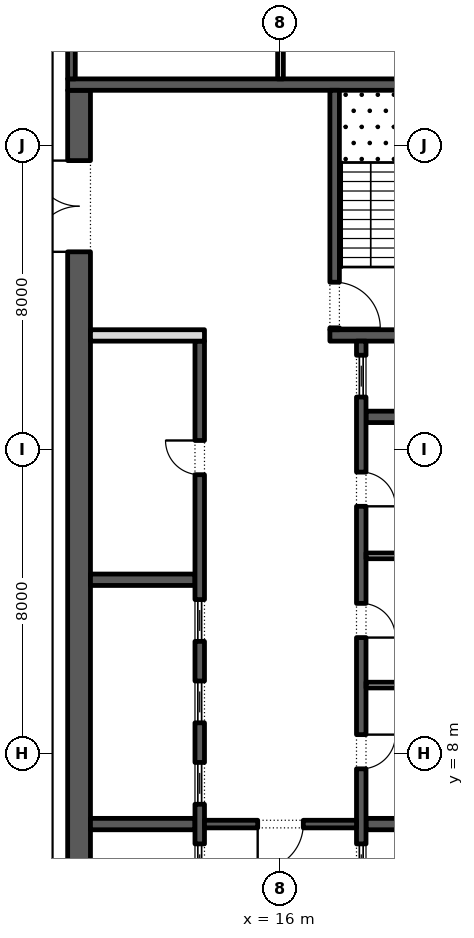
"""IFC4 building model, lengths in metres.
Left out: names, types, materials, properties, quantities, classifications, styles, units other than length and angle.
Written with IfcOpenShell. Run it as: python <this file> out.ifc"""

import sys

from ifc_helpers import new_model, si_unit, direction, frame, frame_2d, origin, place, context, subcontext, project, spatial, rectangle, extrude, element, fill, save


model = new_model("IFC4")
c1 = context("Model", 3, precision=1e-05, world=origin(), true_north=direction((0.0, 1.0)))
c2 = subcontext(c1, "Body", "Model", "MODEL_VIEW")
j1 = project(units=[si_unit("LENGTHUNIT", "METRE"), si_unit("PLANEANGLEUNIT", "RADIAN")], contexts=[c1])
p1 = place(None, origin())
s1 = spatial("IfcSite", under=j1, at=p1, CompositionType="ELEMENT")
p2 = place(p1, origin())
s2 = spatial("IfcBuilding", under=s1, at=p2, CompositionType="ELEMENT")
p3 = place(p2, frame((0.0, 0.0, 264.0)))
s3 = spatial("IfcBuildingStorey", under=s2, at=p3, CompositionType="ELEMENT", Elevation=264.0)
p4 = place(p3, frame((10.7, -2.45, 0.0), z_axis=(0.0, 0.0, 1.0), x_axis=(0.0, 1.0, 0.0)))
e1 = element("IfcWall", 1, at=p4, inside=s3, PredefinedType="SHEAR", context=c2, shape_type="SweptSolid", body=[
    extrude(rectangle(XDim=27.9, YDim=0.6, at=frame_2d((13.95, 0.0))), origin(), (0.0, 0.0, 1.0), 4.0),
])
p5 = place(p4, frame((23.65, 0.0, 0.0)))
e2 = element("IfcOpeningElement", 2, at=p5, cuts=e1, PredefinedType="OPENING", context=c2, shape_type="SweptSolid", body=[
    extrude(rectangle(XDim=2.4, YDim=2.1, at=frame_2d((1.2, 1.05))), frame((0.0, 0.31, 0.0), z_axis=(0.0, -1.0, 0.0), x_axis=(1.0, 0.0, 0.0)), (0.0, 0.0, 1.0), 0.62),
])
p6 = place(p4, frame((1.387, 0.0, 0.0)))
e3 = element("IfcOpeningElement", 3, at=p6, cuts=e1, PredefinedType="OPENING", context=c2, shape_type="SweptSolid", body=[
    extrude(rectangle(XDim=0.9, YDim=2.1, at=frame_2d((0.45, 1.05))), frame((0.0, 0.31, 0.0), z_axis=(0.0, -1.0, 0.0), x_axis=(1.0, 0.0, 0.0)), (0.0, 0.0, 1.0), 0.62),
])
p7 = place(p4, frame((4.562, 0.0, 0.0)))
e4 = element("IfcOpeningElement", 4, at=p7, cuts=e1, PredefinedType="OPENING", context=c2, shape_type="SweptSolid", body=[
    extrude(rectangle(XDim=1.0, YDim=2.1, at=frame_2d((0.5, 1.05))), frame((0.0, 0.31, 0.0), z_axis=(0.0, -1.0, 0.0), x_axis=(1.0, 0.0, 0.0)), (0.0, 0.0, 1.0), 0.62),
])
p8 = place(p3, frame((10.4, 25.6, 0.0), z_axis=(0.0, 0.0, 1.0), x_axis=(1.0, 0.0, 0.0)))
e5 = element("IfcWall", 5, at=p8, inside=s3, PredefinedType="SHEAR", context=c2, shape_type="SweptSolid", body=[
    extrude(rectangle(XDim=11.2, YDim=0.3, at=frame_2d((5.6, 0.0))), origin(), (0.0, 0.0, 1.0), 4.0),
])
p9 = place(p3, frame((17.3, 19.0, 0.0), z_axis=(0.0, 0.0, 1.0), x_axis=(1.0, 0.0, 0.0)))
e6 = element("IfcWall", 6, at=p9, inside=s3, PredefinedType="SHEAR", context=c2, shape_type="SweptSolid", body=[
    extrude(rectangle(XDim=3.7, YDim=0.3, at=frame_2d((1.85, 0.0))), origin(), (0.0, 0.0, 1.0), 4.0),
])
p10 = place(p3, frame((17.425, 19.15, 0.0), z_axis=(0.0, 0.0, 1.0), x_axis=(0.0, 1.0, 0.0)))
e7 = element("IfcWall", 7, at=p10, inside=s3, PredefinedType="SHEAR", context=c2, shape_type="SweptSolid", body=[
    extrude(rectangle(XDim=6.3, YDim=0.25, at=frame_2d((3.15, 0.0))), origin(), (0.0, 0.0, 1.0), 4.0),
])
p11 = place(p10, frame((0.05, 0.0, 0.0)))
e8 = element("IfcOpeningElement", 8, at=p11, cuts=e7, PredefinedType="OPENING", context=c2, shape_type="SweptSolid", body=[
    extrude(rectangle(XDim=1.2, YDim=2.1, at=frame_2d((0.6, 1.05))), frame((0.0, 0.135, 0.0), z_axis=(0.0, -1.0, 0.0), x_axis=(1.0, 0.0, 0.0)), (0.0, 0.0, 1.0), 0.27),
])
for number, where, z_axis, x_axis in (
    (9, (18.25, 6.143, 0.0), (0.0, 0.0, 1.0), (1.0, 0.0, 0.0)),
    (10, (18.25, 16.857, 0.0), (0.0, 0.0, 1.0), (1.0, 0.0, 0.0)),
):
    element("IfcWall", number, at=place(p3, frame(where, z_axis=z_axis, x_axis=x_axis)), inside=s3, PredefinedType="SHEAR", context=c2, shape_type="SweptSolid", body=[
        extrude(rectangle(XDim=2.75, YDim=0.3, at=frame_2d((1.375, 0.0))), origin(), (0.0, 0.0, 1.0), 4.0),
    ])
p12 = place(p3, frame((18.125, 4.15, 0.0), z_axis=(0.0, 0.0, 1.0), x_axis=(0.0, 1.0, 0.0)))
e11 = element("IfcWall", 11, at=p12, inside=s3, PredefinedType="SHEAR", context=c2, shape_type="SweptSolid", body=[
    extrude(rectangle(XDim=14.7, YDim=0.25, at=frame_2d((7.35, 0.0))), origin(), (0.0, 0.0, 1.0), 4.0),
])
p13 = place(p12, frame((3.446, 0.0, 0.0)))
e12 = element("IfcOpeningElement", 12, at=p13, cuts=e11, PredefinedType="OPENING", context=c2, shape_type="SweptSolid", body=[
    extrude(rectangle(XDim=0.9, YDim=2.1, at=frame_2d((0.45, 1.05))), frame((0.0, 0.135, 0.0), z_axis=(0.0, -1.0, 0.0), x_axis=(1.0, 0.0, 0.0)), (0.0, 0.0, 1.0), 0.27),
])
p14 = place(p12, frame((6.9, 0.0, 0.0)))
e13 = element("IfcOpeningElement", 13, at=p14, cuts=e11, PredefinedType="OPENING", context=c2, shape_type="SweptSolid", body=[
    extrude(rectangle(XDim=0.9, YDim=2.1, at=frame_2d((0.45, 1.05))), frame((0.0, 0.135, 0.0), z_axis=(0.0, -1.0, 0.0), x_axis=(1.0, 0.0, 0.0)), (0.0, 0.0, 1.0), 0.27),
])
p15 = place(p12, frame((10.354, 0.0, 0.0)))
e14 = element("IfcOpeningElement", 14, at=p15, cuts=e11, PredefinedType="OPENING", context=c2, shape_type="SweptSolid", body=[
    extrude(rectangle(XDim=0.9, YDim=2.1, at=frame_2d((0.45, 1.05))), frame((0.0, 0.135, 0.0), z_axis=(0.0, -1.0, 0.0), x_axis=(1.0, 0.0, 0.0)), (0.0, 0.0, 1.0), 0.27),
])
p16 = place(p12, frame((0.371, 0.0, 0.0)))
e15 = element("IfcOpeningElement", 15, at=p16, cuts=e11, PredefinedType="OPENING", context=c2, shape_type="SweptSolid", body=[
    extrude(rectangle(XDim=1.1, YDim=2.1, at=frame_2d((0.55, 1.05))), frame((0.0, 0.135, 0.0), z_axis=(0.0, -1.0, 0.0), x_axis=(1.0, 0.0, 0.0)), (0.0, 0.0, 1.0), 0.27),
])
p17 = place(p12, frame((13.229, 0.0, 0.0)))
e16 = element("IfcOpeningElement", 16, at=p17, cuts=e11, PredefinedType="OPENING", context=c2, shape_type="SweptSolid", body=[
    extrude(rectangle(XDim=1.1, YDim=2.1, at=frame_2d((0.55, 1.05))), frame((0.0, 0.135, 0.0), z_axis=(0.0, -1.0, 0.0), x_axis=(1.0, 0.0, 0.0)), (0.0, 0.0, 1.0), 0.27),
])
for number, where, z_axis, x_axis in (
    (17, (18.25, 9.8, 0.0), (0.0, 0.0, 1.0), (1.0, 0.0, 0.0)),
    (18, (18.25, 13.2, 0.0), (0.0, 0.0, 1.0), (1.0, 0.0, 0.0)),
):
    element("IfcWall", number, at=place(p3, frame(where, z_axis=z_axis, x_axis=x_axis)), inside=s3, PredefinedType="PARTITIONING", context=c2, shape_type="SweptSolid", body=[
        extrude(rectangle(XDim=2.75, YDim=0.15, at=frame_2d((1.375, 0.0))), origin(), (0.0, 0.0, 1.0), 4.0),
    ])
for number, where, z_axis, x_axis in (
    (19, (11.0, 6.143, 0.0), (0.0, 0.0, 1.0), (1.0, 0.0, 0.0)),
    (20, (11.0, 12.571, 0.0), (0.0, 0.0, 1.0), (1.0, 0.0, 0.0)),
):
    element("IfcWall", number, at=place(p3, frame(where, z_axis=z_axis, x_axis=x_axis)), inside=s3, PredefinedType="SHEAR", context=c2, shape_type="SweptSolid", body=[
        extrude(rectangle(XDim=2.75, YDim=0.3, at=frame_2d((1.375, 0.0))), origin(), (0.0, 0.0, 1.0), 4.0),
    ])
p18 = place(p3, frame((13.875, -2.45, 0.0), z_axis=(0.0, 0.0, 1.0), x_axis=(0.0, 1.0, 0.0)))
e21 = element("IfcWall", 21, at=p18, inside=s3, PredefinedType="SHEAR", context=c2, shape_type="SweptSolid", body=[
    extrude(rectangle(XDim=21.3, YDim=0.25, at=frame_2d((10.65, 0.0))), origin(), (0.0, 0.0, 1.0), 4.0),
])
p19 = place(p18, frame((17.786, 0.0, 0.0)))
e22 = element("IfcOpeningElement", 22, at=p19, cuts=e21, PredefinedType="OPENING", context=c2, shape_type="SweptSolid", body=[
    extrude(rectangle(XDim=0.9, YDim=2.1, at=frame_2d((0.45, 1.05))), frame((0.0, 0.135, 0.0), z_axis=(0.0, -1.0, 0.0), x_axis=(1.0, 0.0, 0.0)), (0.0, 0.0, 1.0), 0.27),
])
p20 = place(p18, frame((6.971, 0.0, 0.0)))
e23 = element("IfcOpeningElement", 23, at=p20, cuts=e21, PredefinedType="OPENING", context=c2, shape_type="SweptSolid", body=[
    extrude(rectangle(XDim=1.1, YDim=2.1, at=frame_2d((0.55, 1.05))), frame((0.0, 0.135, 0.0), z_axis=(0.0, -1.0, 0.0), x_axis=(1.0, 0.0, 0.0)), (0.0, 0.0, 1.0), 0.27),
])
p21 = place(p18, frame((9.114, 0.0, 0.0)))
e24 = element("IfcOpeningElement", 24, at=p21, cuts=e21, PredefinedType="OPENING", context=c2, shape_type="SweptSolid", body=[
    extrude(rectangle(XDim=1.1, YDim=2.1, at=frame_2d((0.55, 1.05))), frame((0.0, 0.135, 0.0), z_axis=(0.0, -1.0, 0.0), x_axis=(1.0, 0.0, 0.0)), (0.0, 0.0, 1.0), 0.27),
])
p22 = place(p18, frame((11.257, 0.0, 0.0)))
e25 = element("IfcOpeningElement", 25, at=p22, cuts=e21, PredefinedType="OPENING", context=c2, shape_type="SweptSolid", body=[
    extrude(rectangle(XDim=1.1, YDim=2.1, at=frame_2d((0.55, 1.05))), frame((0.0, 0.135, 0.0), z_axis=(0.0, -1.0, 0.0), x_axis=(1.0, 0.0, 0.0)), (0.0, 0.0, 1.0), 0.27),
])
p23 = place(p18, frame((13.4, 0.0, 0.0)))
e26 = element("IfcOpeningElement", 26, at=p23, cuts=e21, PredefinedType="OPENING", context=c2, shape_type="SweptSolid", body=[
    extrude(rectangle(XDim=1.1, YDim=2.1, at=frame_2d((0.55, 1.05))), frame((0.0, 0.135, 0.0), z_axis=(0.0, -1.0, 0.0), x_axis=(1.0, 0.0, 0.0)), (0.0, 0.0, 1.0), 0.27),
])
p24 = place(p3, frame((11.0, 19.0, 0.0), z_axis=(0.0, 0.0, 1.0), x_axis=(1.0, 0.0, 0.0)))
e27 = element("IfcWall", 27, at=p24, inside=s3, PredefinedType="PARTITIONING", context=c2, shape_type="SweptSolid", body=[
    extrude(rectangle(XDim=3.0, YDim=0.3, at=frame_2d((1.5, 0.0))), origin(), (0.0, 0.0, 1.0), 4.0),
])
p25 = place(p3, frame((14.0, 6.143, 0.0), z_axis=(0.0, 0.0, 1.0), x_axis=(1.0, 0.0, 0.0)))
e28 = element("IfcWall", 28, at=p25, inside=s3, PredefinedType="SHEAR", context=c2, shape_type="SweptSolid", body=[
    extrude(rectangle(XDim=4.0, YDim=0.2, at=frame_2d((2.0, 0.0))), origin(), (0.0, 0.0, 1.0), 4.0),
])
p26 = place(p25, frame((1.4, 0.0, 0.0)))
e29 = element("IfcOpeningElement", 29, at=p26, cuts=e28, PredefinedType="OPENING", context=c2, shape_type="SweptSolid", body=[
    extrude(rectangle(XDim=1.2, YDim=2.1, at=frame_2d((0.6, 1.05))), frame((0.0, 0.11, 0.0), z_axis=(0.0, -1.0, 0.0), x_axis=(1.0, 0.0, 0.0)), (0.0, 0.0, 1.0), 0.22),
])
p27 = place(p3, frame((10.5, 25.75, 0.0), z_axis=(0.0, 0.0, 1.0), x_axis=(0.0, 1.0, 0.0)))
e30 = element("IfcWall", 30, at=p27, inside=s3, PredefinedType="SHEAR", context=c2, shape_type="SweptSolid", body=[
    extrude(rectangle(XDim=4.75, YDim=0.2, at=frame_2d((2.375, 0.0))), origin(), (0.0, 0.0, 1.0), 4.0),
])
p28 = place(p27, frame((1.925, 0.0, 0.0)))
e31 = element("IfcOpeningElement", 31, at=p28, cuts=e30, PredefinedType="OPENING", context=c2, shape_type="SweptSolid", body=[
    extrude(rectangle(XDim=0.9, YDim=2.1, at=frame_2d((0.45, 1.05))), frame((0.0, 0.11, 0.0), z_axis=(0.0, -1.0, 0.0), x_axis=(1.0, 0.0, 0.0)), (0.0, 0.0, 1.0), 0.22),
])
p29 = place(p3, frame((16.0, 25.75, 0.0), z_axis=(0.0, 0.0, 1.0), x_axis=(0.0, 1.0, 0.0)))
e32 = element("IfcWall", 32, at=p29, inside=s3, PredefinedType="PARTITIONING", context=c2, shape_type="SweptSolid", body=[
    extrude(rectangle(XDim=4.75, YDim=0.15, at=frame_2d((2.375, 0.0))), origin(), (0.0, 0.0, 1.0), 4.0),
])
p30 = place(p13, frame((0.9, -0.2, 0.0), z_axis=(0.0, 0.0, 1.0), x_axis=(-1.0, 0.0, 0.0)))
e33 = element("IfcDoor", 33, at=p30, inside=s3, OperationType="SINGLE_SWING_RIGHT", PredefinedType="DOOR", context=c2, shape_type="SweptSolid", body=[
    extrude(rectangle(XDim=0.9, YDim=2.1, at=frame_2d((0.45, 1.05))), frame((0.0, -0.075, 0.0), z_axis=(0.0, -1.0, 0.0), x_axis=(1.0, 0.0, 0.0)), (0.0, 0.0, 1.0), 0.05),
])
fill(e12, e33)
p31 = place(p14, frame((0.9, -0.2, 0.0), z_axis=(0.0, 0.0, 1.0), x_axis=(-1.0, 0.0, 0.0)))
e34 = element("IfcDoor", 34, at=p31, inside=s3, OperationType="SINGLE_SWING_LEFT", PredefinedType="DOOR", context=c2, shape_type="SweptSolid", body=[
    extrude(rectangle(XDim=0.9, YDim=2.1, at=frame_2d((0.45, 1.05))), frame((0.0, -0.075, 0.0), z_axis=(0.0, -1.0, 0.0), x_axis=(1.0, 0.0, 0.0)), (0.0, 0.0, 1.0), 0.05),
])
fill(e13, e34)
p32 = place(p15, frame((0.9, -0.2, 0.0), z_axis=(0.0, 0.0, 1.0), x_axis=(-1.0, 0.0, 0.0)))
e35 = element("IfcDoor", 35, at=p32, inside=s3, OperationType="SINGLE_SWING_LEFT", PredefinedType="DOOR", context=c2, shape_type="SweptSolid", body=[
    extrude(rectangle(XDim=0.9, YDim=2.1, at=frame_2d((0.45, 1.05))), frame((0.0, -0.075, 0.0), z_axis=(0.0, -1.0, 0.0), x_axis=(1.0, 0.0, 0.0)), (0.0, 0.0, 1.0), 0.05),
])
fill(e14, e35)
p33 = place(p16, origin())
e36 = element("IfcDoor", 36, at=p33, inside=s3, OperationType="SLIDING_TO_LEFT", PredefinedType="DOOR", context=c2, shape_type="SweptSolid", body=[
    extrude(rectangle(XDim=1.1, YDim=2.1, at=frame_2d((0.55, 1.05))), frame((0.0, 0.025, 0.0), z_axis=(0.0, -1.0, 0.0), x_axis=(1.0, 0.0, 0.0)), (0.0, 0.0, 1.0), 0.05),
])
fill(e15, e36)
p34 = place(p17, origin())
e37 = element("IfcDoor", 37, at=p34, inside=s3, OperationType="SLIDING_TO_LEFT", PredefinedType="DOOR", context=c2, shape_type="SweptSolid", body=[
    extrude(rectangle(XDim=1.1, YDim=2.1, at=frame_2d((0.55, 1.05))), frame((0.0, 0.025, 0.0), z_axis=(0.0, -1.0, 0.0), x_axis=(1.0, 0.0, 0.0)), (0.0, 0.0, 1.0), 0.05),
])
fill(e16, e37)
p35 = place(p19, origin())
e38 = element("IfcDoor", 38, at=p35, inside=s3, OperationType="SINGLE_SWING_LEFT", PredefinedType="DOOR", context=c2, shape_type="SweptSolid", body=[
    extrude(rectangle(XDim=0.9, YDim=2.1, at=frame_2d((0.45, 1.05))), frame((0.0, 0.125, 0.0), z_axis=(0.0, -1.0, 0.0), x_axis=(1.0, 0.0, 0.0)), (0.0, 0.0, 1.0), 0.05),
])
fill(e22, e38)
p36 = place(p20, origin())
e39 = element("IfcDoor", 39, at=p36, inside=s3, OperationType="SLIDING_TO_LEFT", PredefinedType="DOOR", context=c2, shape_type="SweptSolid", body=[
    extrude(rectangle(XDim=1.1, YDim=2.1, at=frame_2d((0.55, 1.05))), frame((0.0, 0.025, 0.0), z_axis=(0.0, -1.0, 0.0), x_axis=(1.0, 0.0, 0.0)), (0.0, 0.0, 1.0), 0.05),
])
fill(e23, e39)
p37 = place(p21, origin())
e40 = element("IfcDoor", 40, at=p37, inside=s3, OperationType="SLIDING_TO_LEFT", PredefinedType="DOOR", context=c2, shape_type="SweptSolid", body=[
    extrude(rectangle(XDim=1.1, YDim=2.1, at=frame_2d((0.55, 1.05))), frame((0.0, 0.025, 0.0), z_axis=(0.0, -1.0, 0.0), x_axis=(1.0, 0.0, 0.0)), (0.0, 0.0, 1.0), 0.05),
])
fill(e24, e40)
p38 = place(p22, origin())
e41 = element("IfcDoor", 41, at=p38, inside=s3, OperationType="SLIDING_TO_LEFT", PredefinedType="DOOR", context=c2, shape_type="SweptSolid", body=[
    extrude(rectangle(XDim=1.1, YDim=2.1, at=frame_2d((0.55, 1.05))), frame((0.0, 0.025, 0.0), z_axis=(0.0, -1.0, 0.0), x_axis=(1.0, 0.0, 0.0)), (0.0, 0.0, 1.0), 0.05),
])
fill(e25, e41)
p39 = place(p23, origin())
e42 = element("IfcDoor", 42, at=p39, inside=s3, OperationType="SLIDING_TO_LEFT", PredefinedType="DOOR", context=c2, shape_type="SweptSolid", body=[
    extrude(rectangle(XDim=1.1, YDim=2.1, at=frame_2d((0.55, 1.05))), frame((0.0, 0.025, 0.0), z_axis=(0.0, -1.0, 0.0), x_axis=(1.0, 0.0, 0.0)), (0.0, 0.0, 1.0), 0.05),
])
fill(e26, e42)
p40 = place(p26, frame((1.2, 0.0, 0.0), z_axis=(0.0, 0.0, 1.0), x_axis=(-1.0, 0.0, 0.0)))
e43 = element("IfcDoor", 43, at=p40, inside=s3, OperationType="SINGLE_SWING_LEFT", PredefinedType="DOOR", context=c2, shape_type="SweptSolid", body=[
    extrude(rectangle(XDim=1.2, YDim=2.1, at=frame_2d((0.6, 1.05))), frame((0.0, 0.025, 0.0), z_axis=(0.0, -1.0, 0.0), x_axis=(1.0, 0.0, 0.0)), (0.0, 0.0, 1.0), 0.05),
])
fill(e29, e43)
p41 = place(p5, origin())
e44 = element("IfcDoor", 44, at=p41, inside=s3, OperationType="DOUBLE_DOOR_SINGLE_SWING", PredefinedType="DOOR", context=c2, shape_type="SweptSolid", body=[
    extrude(rectangle(XDim=2.4, YDim=2.1, at=frame_2d((1.2, 1.05))), frame((0.0, 0.025, 0.0), z_axis=(0.0, -1.0, 0.0), x_axis=(1.0, 0.0, 0.0)), (0.0, 0.0, 1.0), 0.05),
])
fill(e2, e44)
p42 = place(p11, frame((1.2, 0.0, 0.0), z_axis=(0.0, 0.0, 1.0), x_axis=(-1.0, 0.0, 0.0)))
e45 = element("IfcDoor", 45, at=p42, inside=s3, OperationType="SINGLE_SWING_LEFT", PredefinedType="DOOR", context=c2, shape_type="SweptSolid", body=[
    extrude(rectangle(XDim=1.2, YDim=2.1, at=frame_2d((0.6, 1.05))), frame((0.0, 0.025, 0.0), z_axis=(0.0, -1.0, 0.0), x_axis=(1.0, 0.0, 0.0)), (0.0, 0.0, 1.0), 0.05),
])
fill(e8, e45)
save(model, sys.argv[1])
